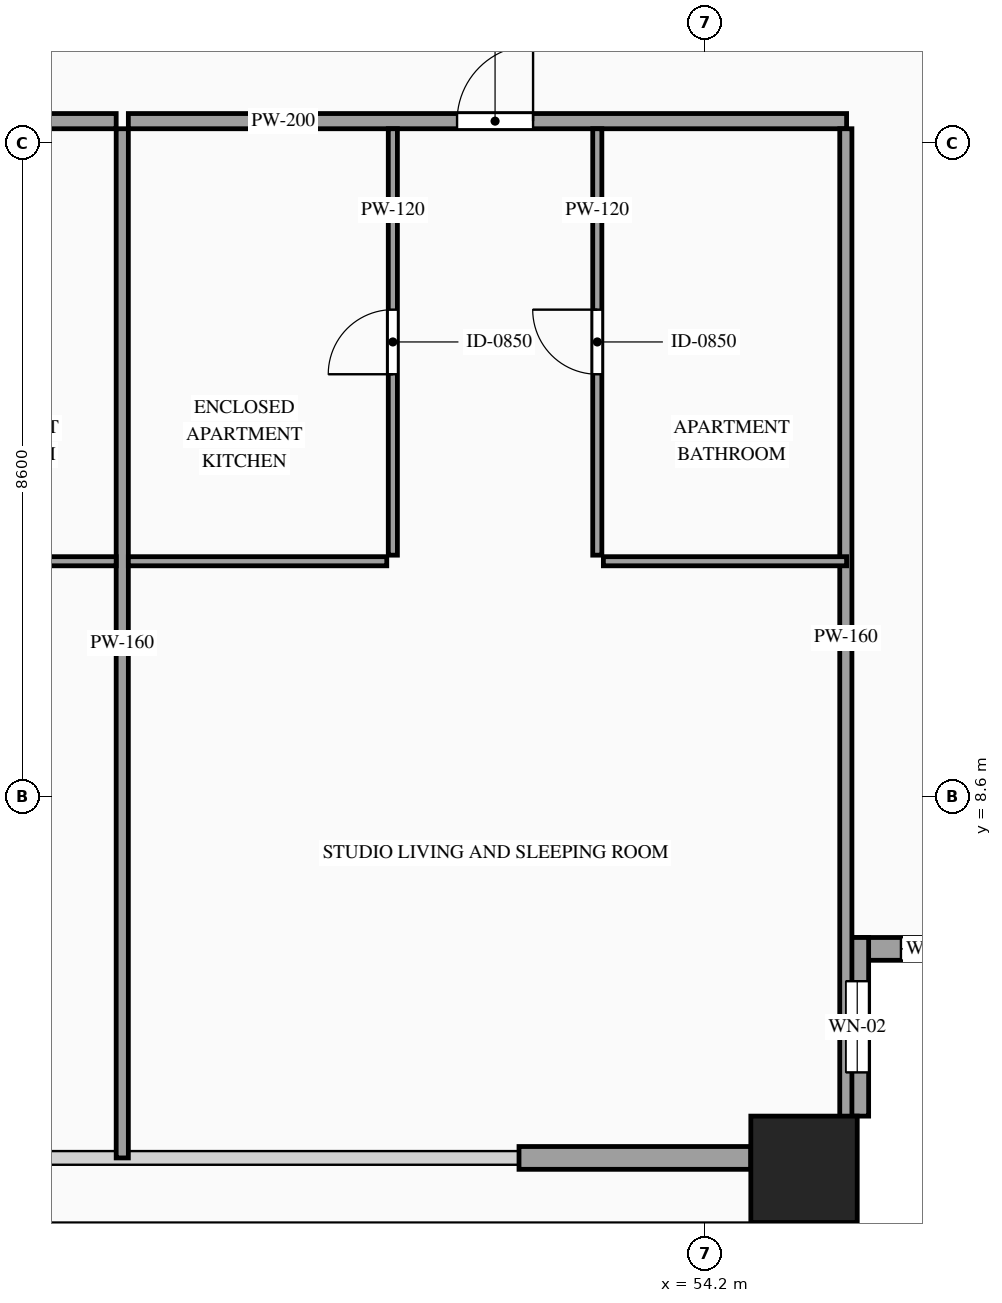
"""IFC4 building model, lengths in metres.
Left out: names, types, materials, properties, quantities, classifications, styles, units other than length and angle.
Written with IfcOpenShell. Run it as: python <this file> out.ifc"""

import sys

from ifc_helpers import new_model, si_unit, direction, frame, frame_2d, origin, origin_2d, place, context, subcontext, project, spatial, rectangle, hollow_rectangle, extrude, source, transform, mapped, element, fill, save


model = new_model("IFC4")
c1 = context("Model", 3, precision=1e-05, world=origin(), true_north=direction((0.0, 1.0)))
c2 = subcontext(c1, "Body", "Model", "MODEL_VIEW")
j1 = project(units=[si_unit("LENGTHUNIT", "METRE"), si_unit("PLANEANGLEUNIT", "RADIAN")], contexts=[c1])
p1 = place(None, origin())
s1 = spatial("IfcSite", under=j1, at=p1, CompositionType="ELEMENT")
p2 = place(p1, origin())
s2 = spatial("IfcBuilding", under=s1, at=p2, CompositionType="ELEMENT")
p3 = place(p2, frame((0.0, 0.0, 184.5)))
s3 = spatial("IfcBuildingStorey", under=s2, at=p3, CompositionType="ELEMENT", Elevation=184.5)
m1 = source(origin(), c2, "Body", "SweptSolid", [
    extrude(hollow_rectangle(XDim=1.4, YDim=1.4, WallThickness=0.06, at=origin_2d()), origin(), (0.0, 0.0, 1.0), 3.5),
])
p4 = place(p3, frame((55.5, 3.7, 0.0), z_axis=(0.0, 0.0, 1.0), x_axis=(1.0, 0.0, 0.0)))
e1 = element("IfcColumn", 1, at=p4, inside=s3, PredefinedType="COLUMN", context=c2, shape_type="MappedRepresentation", body=[
    mapped(m1, transform((0.0, 0.0, 0.0), scale=1.0)),
])
p5 = place(p3, frame((56.05, 6.6, 0.0), z_axis=(0.0, 0.0, 1.0), x_axis=(1.0, 0.0, 0.0)))
e2 = element("IfcWall", 2, at=p5, inside=s3, PredefinedType="SOLIDWALL", context=c2, shape_type="SweptSolid", body=[
    extrude(rectangle(XDim=2.35, YDim=0.3, at=frame_2d((1.175, 0.0))), origin(), (0.0, 0.0, 1.0), 3.28),
])
p6 = place(p5, frame((0.725, 0.0, 0.85)))
e3 = element("IfcOpeningElement", 3, at=p6, cuts=e2, PredefinedType="OPENING", context=c2, shape_type="SweptSolid", body=[
    extrude(rectangle(XDim=0.9, YDim=1.5, at=frame_2d((0.45, 0.75))), frame((0.0, 0.165, 0.0), z_axis=(0.0, -1.0, 0.0), x_axis=(1.0, 0.0, 0.0)), (0.0, 0.0, 1.0), 0.33),
])
p7 = place(p3, frame((56.2, 4.4, 0.0), z_axis=(0.0, 0.0, 1.0), x_axis=(0.0, 1.0, 0.0)))
e4 = element("IfcWall", 4, at=p7, inside=s3, PredefinedType="SOLIDWALL", context=c2, shape_type="SweptSolid", body=[
    extrude(rectangle(XDim=2.35, YDim=0.3, at=frame_2d((1.175, 0.0))), origin(), (0.0, 0.0, 1.0), 3.28),
])
p8 = place(p7, frame((0.575, 0.0, 0.85)))
e5 = element("IfcOpeningElement", 5, at=p8, cuts=e4, PredefinedType="OPENING", context=c2, shape_type="SweptSolid", body=[
    extrude(rectangle(XDim=1.2, YDim=2.1, at=frame_2d((0.6, 1.05))), frame((0.0, 0.165, 0.0), z_axis=(0.0, -1.0, 0.0), x_axis=(1.0, 0.0, 0.0)), (0.0, 0.0, 1.0), 0.33),
])
m2 = source(origin(), c2, "Body", "SweptSolid", [
    extrude(rectangle(XDim=3.05, YDim=0.3, at=frame_2d((1.525, 0.0))), origin(), (0.0, 0.0, 1.0), 2.835),
])
p9 = place(p3, frame((51.75, 3.85, 0.0), z_axis=(0.0, 0.0, 1.0), x_axis=(1.0, 0.0, 0.0)))
e6 = element("IfcWall", 6, at=p9, inside=s3, PredefinedType="SOLIDWALL", context=c2, shape_type="MappedRepresentation", body=[
    mapped(m2, transform((0.0, 0.0, 0.0), scale=1.0)),
])
p10 = place(p3, frame((37.08, 17.49, 0.0), z_axis=(0.0, 0.0, 1.0), x_axis=(1.0, 0.0, 0.0)))
e7 = element("IfcWall", 7, at=p10, inside=s3, PredefinedType="PARTITIONING", context=c2, shape_type="SweptSolid", body=[
    extrude(rectangle(XDim=9.37, YDim=0.2, at=frame_2d((4.685, 0.0))), origin(), (0.0, 0.0, 1.0), 3.28),
])
p11 = place(p10, frame((4.282, 0.0, 0.0)))
e8 = element("IfcOpeningElement", 8, at=p11, cuts=e7, PredefinedType="OPENING", context=c2, shape_type="SweptSolid", body=[
    extrude(rectangle(XDim=1.0, YDim=2.2, at=frame_2d((0.5, 1.1))), frame((0.0, 0.115, 0.0), z_axis=(0.0, -1.0, 0.0), x_axis=(1.0, 0.0, 0.0)), (0.0, 0.0, 1.0), 0.23),
])
m3 = source(origin(), c2, "Body", "SweptSolid", [
    extrude(rectangle(XDim=13.54, YDim=0.16, at=frame_2d((6.77, 0.0))), origin(), (0.0, 0.0, 1.0), 3.28),
])
p12 = place(p3, frame((46.53, 3.85, 0.0), z_axis=(0.0, 0.0, 1.0), x_axis=(0.0, 1.0, 0.0)))
e9 = element("IfcWall", 9, at=p12, inside=s3, PredefinedType="PARTITIONING", context=c2, shape_type="MappedRepresentation", body=[
    mapped(m3, transform((0.0, 0.0, 0.0), scale=1.0)),
])
m4 = source(origin(), c2, "Body", "SweptSolid", [
    extrude(rectangle(XDim=3.2, YDim=0.12, at=frame_2d((1.6, 0.0))), origin(), (0.0, 0.0, 1.0), 2.875),
])
p13 = place(p3, frame((43.25, 11.7, 0.0), z_axis=(0.0, 0.0, 1.0), x_axis=(1.0, 0.0, 0.0)))
e10 = element("IfcWall", 10, at=p13, inside=s3, PredefinedType="PARTITIONING", context=c2, shape_type="MappedRepresentation", body=[
    mapped(m4, transform((0.0, 0.0, 0.0), scale=1.0)),
])
p14 = place(p3, frame((46.61, 17.49, 0.0), z_axis=(0.0, 0.0, 1.0), x_axis=(1.0, 0.0, 0.0)))
e11 = element("IfcWall", 11, at=p14, inside=s3, PredefinedType="PARTITIONING", context=c2, shape_type="SweptSolid", body=[
    extrude(rectangle(XDim=9.45, YDim=0.2, at=frame_2d((4.725, 0.0))), origin(), (0.0, 0.0, 1.0), 3.28),
])
p15 = place(p14, frame((4.325, 0.0, 0.0)))
e12 = element("IfcOpeningElement", 12, at=p15, cuts=e11, PredefinedType="OPENING", context=c2, shape_type="SweptSolid", body=[
    extrude(rectangle(XDim=1.0, YDim=2.2, at=frame_2d((0.5, 1.1))), frame((0.0, 0.115, 0.0), z_axis=(0.0, -1.0, 0.0), x_axis=(1.0, 0.0, 0.0)), (0.0, 0.0, 1.0), 0.23),
])
m5 = source(origin(), c2, "Body", "SweptSolid", [
    extrude(rectangle(XDim=13.39, YDim=0.16, at=frame_2d((6.695, 0.0))), origin(), (0.0, 0.0, 1.0), 3.28),
])
p16 = place(p3, frame((56.05, 4.0, 0.0), z_axis=(0.0, 0.0, 1.0), x_axis=(0.0, 1.0, 0.0)))
e13 = element("IfcWall", 13, at=p16, inside=s3, PredefinedType="PARTITIONING", context=c2, shape_type="MappedRepresentation", body=[
    mapped(m5, transform((0.0, 0.0, 0.0), scale=1.0)),
])
m6 = source(origin(), c2, "Body", "SweptSolid", [
    extrude(rectangle(XDim=3.4, YDim=0.12, at=frame_2d((1.7, 0.0))), origin(), (0.0, 0.0, 1.0), 2.875),
])
p17 = place(p3, frame((46.61, 11.7, 0.0), z_axis=(0.0, 0.0, 1.0), x_axis=(1.0, 0.0, 0.0)))
e14 = element("IfcWall", 14, at=p17, inside=s3, PredefinedType="PARTITIONING", context=c2, shape_type="MappedRepresentation", body=[
    mapped(m6, transform((0.0, 0.0, 0.0), scale=1.0)),
])
p18 = place(p3, frame((50.09, 11.78, 0.0), z_axis=(0.0, 0.0, 1.0), x_axis=(0.0, 1.0, 0.0)))
e15 = element("IfcWall", 15, at=p18, inside=s3, PredefinedType="PARTITIONING", context=c2, shape_type="SweptSolid", body=[
    extrude(rectangle(XDim=5.61, YDim=0.12, at=frame_2d((2.805, 0.0))), origin(), (0.0, 0.0, 1.0), 2.775),
])
p19 = place(p18, frame((2.38, 0.0, 0.0)))
e16 = element("IfcOpeningElement", 16, at=p19, cuts=e15, PredefinedType="OPENING", context=c2, shape_type="SweptSolid", body=[
    extrude(rectangle(XDim=0.85, YDim=2.1, at=frame_2d((0.425, 1.05))), frame((0.0, 0.075, 0.0), z_axis=(0.0, -1.0, 0.0), x_axis=(1.0, 0.0, 0.0)), (0.0, 0.0, 1.0), 0.15),
])
m7 = source(origin(), c2, "Body", "SweptSolid", [
    extrude(rectangle(XDim=3.2, YDim=0.12, at=frame_2d((1.6, 0.0))), origin(), (0.0, 0.0, 1.0), 3.28),
])
p20 = place(p3, frame((52.86, 11.7, 0.0), z_axis=(0.0, 0.0, 1.0), x_axis=(1.0, 0.0, 0.0)))
e17 = element("IfcWall", 17, at=p20, inside=s3, PredefinedType="PARTITIONING", context=c2, shape_type="MappedRepresentation", body=[
    mapped(m7, transform((0.0, 0.0, 0.0), scale=1.0)),
])
p21 = place(p3, frame((52.78, 11.78, 0.0), z_axis=(0.0, 0.0, 1.0), x_axis=(0.0, 1.0, 0.0)))
e18 = element("IfcWall", 18, at=p21, inside=s3, PredefinedType="PARTITIONING", context=c2, shape_type="SweptSolid", body=[
    extrude(rectangle(XDim=5.61, YDim=0.12, at=frame_2d((2.805, 0.0))), origin(), (0.0, 0.0, 1.0), 3.28),
])
p22 = place(p21, frame((2.38, 0.0, 0.0)))
e19 = element("IfcOpeningElement", 19, at=p22, cuts=e18, PredefinedType="OPENING", context=c2, shape_type="SweptSolid", body=[
    extrude(rectangle(XDim=0.85, YDim=2.1, at=frame_2d((0.425, 1.05))), frame((0.0, 0.075, 0.0), z_axis=(0.0, -1.0, 0.0), x_axis=(1.0, 0.0, 0.0)), (0.0, 0.0, 1.0), 0.15),
])
m8 = source(origin(), c2, "Body", "SweptSolid", [
    extrude(rectangle(XDim=0.9, YDim=1.5, at=frame_2d((0.45, 0.75))), frame((0.0, 0.03, 0.0), z_axis=(0.0, -1.0, 0.0), x_axis=(1.0, 0.0, 0.0)), (0.0, 0.0, 1.0), 0.06),
])
p23 = place(p6, origin())
e20 = element("IfcWindow", 20, at=p23, inside=s3, PartitioningType="SINGLE_PANEL", PredefinedType="WINDOW", context=c2, shape_type="MappedRepresentation", body=[
    mapped(m8, transform((0.0, 0.0, 0.0), scale=1.0)),
])
fill(e3, e20)
m9 = source(origin(), c2, "Body", "SweptSolid", [
    extrude(rectangle(XDim=1.2, YDim=2.1, at=frame_2d((0.6, 1.05))), frame((0.0, 0.03, 0.0), z_axis=(0.0, -1.0, 0.0), x_axis=(1.0, 0.0, 0.0)), (0.0, 0.0, 1.0), 0.06),
])
p24 = place(p8, origin())
e21 = element("IfcWindow", 21, at=p24, inside=s3, PartitioningType="SINGLE_PANEL", PredefinedType="WINDOW", context=c2, shape_type="MappedRepresentation", body=[
    mapped(m9, transform((0.0, 0.0, 0.0), scale=1.0)),
])
fill(e5, e21)
m10 = source(origin(), c2, "Body", "SweptSolid", [
    extrude(rectangle(XDim=1.0, YDim=2.2, at=frame_2d((0.5, 1.1))), frame((0.0, 0.025, 0.0), z_axis=(0.0, -1.0, 0.0), x_axis=(1.0, 0.0, 0.0)), (0.0, 0.0, 1.0), 0.05),
])
p25 = place(p15, origin())
e22 = element("IfcDoor", 22, at=p25, inside=s3, OperationType="SINGLE_SWING_RIGHT", PredefinedType="DOOR", context=c2, shape_type="MappedRepresentation", body=[
    mapped(m10, transform((0.0, 0.0, 0.0), scale=1.0)),
])
fill(e12, e22)
m11 = source(origin(), c2, "Body", "SweptSolid", [
    extrude(rectangle(XDim=0.85, YDim=2.1, at=frame_2d((0.425, 1.05))), frame((0.0, 0.025, 0.0), z_axis=(0.0, -1.0, 0.0), x_axis=(1.0, 0.0, 0.0)), (0.0, 0.0, 1.0), 0.05),
])
p26 = place(p19, origin())
e23 = element("IfcDoor", 23, at=p26, inside=s3, OperationType="SINGLE_SWING_LEFT", PredefinedType="DOOR", context=c2, shape_type="MappedRepresentation", body=[
    mapped(m11, transform((0.0, 0.0, 0.0), scale=1.0)),
])
fill(e16, e23)
p27 = place(p22, origin())
e24 = element("IfcDoor", 24, at=p27, inside=s3, OperationType="SINGLE_SWING_RIGHT", PredefinedType="DOOR", context=c2, shape_type="MappedRepresentation", body=[
    mapped(m11, transform((0.0, 0.0, 0.0), scale=1.0)),
])
fill(e19, e24)
save(model, sys.argv[1])
